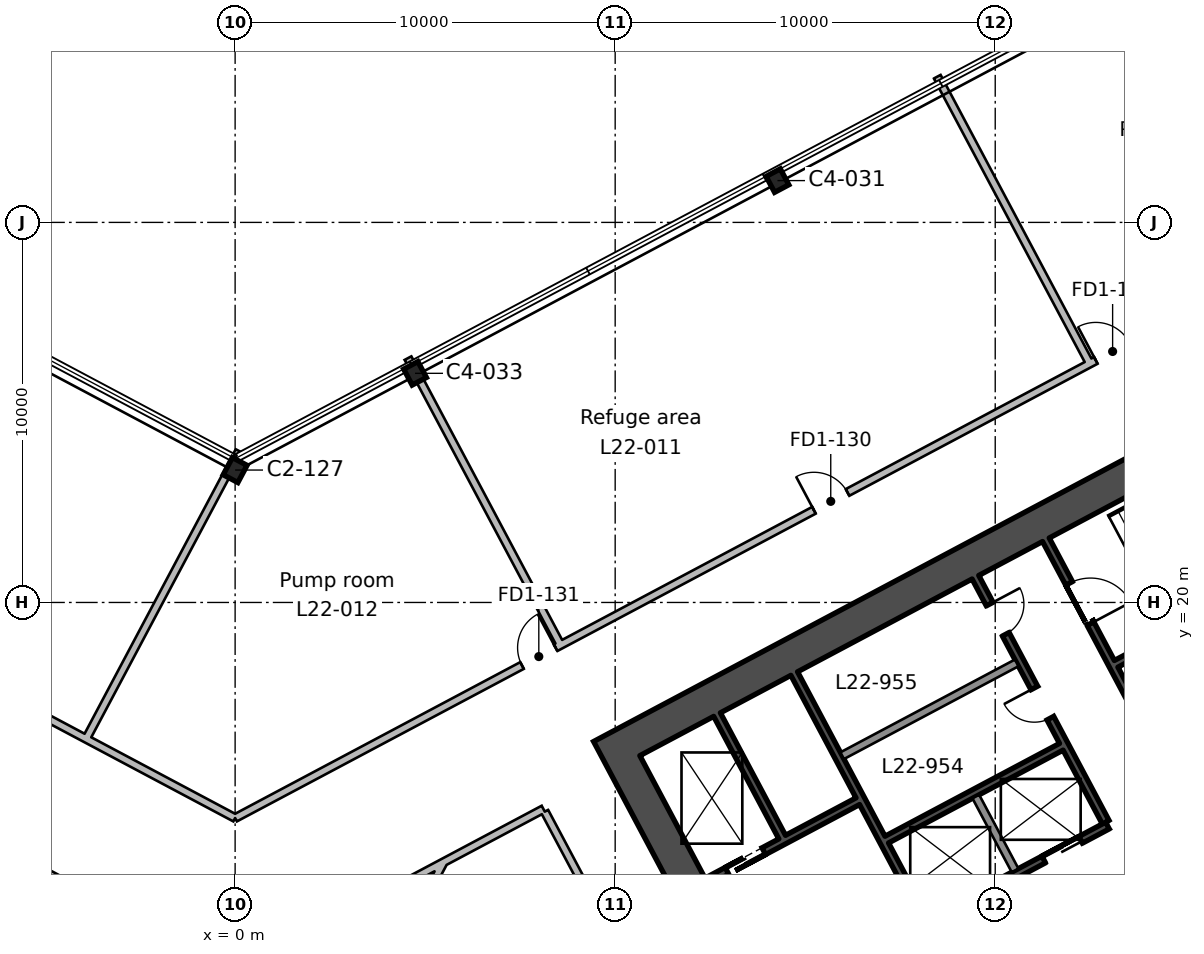
"""IFC4 building model, lengths in metres.
Left out: names, types, materials, properties, quantities, classifications, styles, units other than length and angle.
Written with IfcOpenShell. Run it as: python <this file> out.ifc"""

import sys

from ifc_helpers import new_model, si_unit, direction, frame, frame_2d, origin, origin_2d, place, context, subcontext, project, spatial, rectangle, i_section, extrude, element, fill, save


model = new_model("IFC4")
c1 = context("Model", 3, precision=1e-05, world=origin(), true_north=direction((0.0, 1.0)))
c2 = subcontext(c1, "Body", "Model", "MODEL_VIEW")
j1 = project(units=[si_unit("LENGTHUNIT", "METRE"), si_unit("PLANEANGLEUNIT", "RADIAN")], contexts=[c1])
p1 = place(None, origin())
s1 = spatial("IfcSite", under=j1, at=p1, CompositionType="ELEMENT")
p2 = place(p1, origin())
s2 = spatial("IfcBuilding", under=s1, at=p2, CompositionType="ELEMENT")
p3 = place(p2, frame((0.0, 0.0, 112.2)))
s3 = spatial("IfcBuildingStorey", under=s2, at=p3, CompositionType="ELEMENT", Elevation=112.2)
p4 = place(p3, frame((0.0, 23.484, 0.0), z_axis=(0.0, 0.0, 1.0), x_axis=(-0.882947592859, 0.469471562786, 0.0)))
e1 = element("IfcColumn", 1, at=p4, inside=s3, PredefinedType="COLUMN", context=c2, shape_type="SweptSolid", body=[
    extrude(i_section(OverallWidth=0.437, OverallDepth=0.513, WebThickness=0.061, FlangeThickness=0.097, FilletRadius=0.015, at=origin_2d()), origin(), (0.0, 0.0, 1.0), 6.0),
])
for number, where, z_axis, x_axis in (
    (2, (4.734, 26.029, 0.0), (0.0, 0.0, 1.0), (-0.883, -0.469, 0.0)),
    (3, (14.27, 31.1, 0.0), (0.0, 0.0, 1.0), (-0.883, -0.469, 0.0)),
):
    element("IfcColumn", number, at=place(p3, frame(where, z_axis=z_axis, x_axis=x_axis)), inside=s3, PredefinedType="COLUMN", context=c2, shape_type="SweptSolid", body=[
        extrude(i_section(OverallWidth=0.424, OverallDepth=0.475, WebThickness=0.048, FlangeThickness=0.077, FilletRadius=0.015, at=origin_2d()), origin(), (0.0, 0.0, 1.0), 6.0),
    ])
p5 = place(p3, frame((19.219, -1.107, 0.0), z_axis=(0.0, 0.0, 1.0), x_axis=(-0.46947084998, 0.882947971864, 0.0)))
e4 = element("IfcWall", 4, at=p5, inside=s3, PredefinedType="SHEAR", context=c2, shape_type="SweptSolid", body=[
    extrude(rectangle(XDim=20.0, YDim=0.9, at=frame_2d((10.0, 0.0))), origin(), (0.0, 0.0, 1.0), 6.0),
])
p6 = place(p5, frame((7.0, 0.0, 0.0)))
e5 = element("IfcOpeningElement", 5, at=p6, cuts=e4, PredefinedType="OPENING", context=c2, shape_type="SweptSolid", body=[
    extrude(rectangle(XDim=2.4, YDim=2.4, at=frame_2d((1.2, 1.2))), frame((0.0, 0.46, 0.0), z_axis=(0.0, -1.0, 0.0), x_axis=(1.0, 0.0, 0.0)), (0.0, 0.0, 1.0), 0.92),
])
p7 = place(p3, frame((10.438, 16.366, 0.0), z_axis=(0.0, 0.0, 1.0), x_axis=(0.88294509198, 0.469476266226, 0.0)))
e6 = element("IfcWall", 6, at=p7, inside=s3, PredefinedType="SHEAR", context=c2, shape_type="SweptSolid", body=[
    extrude(rectangle(XDim=20.2, YDim=0.9, at=frame_2d((10.1, 0.0))), origin(), (0.0, 0.0, 1.0), 6.0),
])
p8 = place(p3, frame((14.394, 13.826, 0.0), z_axis=(0.0, 0.0, 1.0), x_axis=(-0.469494272526, 0.882935517501, 0.0)))
e7 = element("IfcWall", 7, at=p8, inside=s3, PredefinedType="SHEAR", context=c2, shape_type="SweptSolid", body=[
    extrude(rectangle(XDim=3.65, YDim=0.2, at=frame_2d((1.825, 0.0))), origin(), (0.0, 0.0, 1.0), 6.0),
])
p9 = place(p3, frame((18.138, 11.683, 0.0), z_axis=(0.0, 0.0, 1.0), x_axis=(-0.469480409012, 0.88294288918, 0.0)))
e8 = element("IfcWall", 8, at=p9, inside=s3, PredefinedType="SHEAR", context=c2, shape_type="SweptSolid", body=[
    extrude(rectangle(XDim=7.3, YDim=0.2, at=frame_2d((3.65, 0.0))), origin(), (0.0, 0.0, 1.0), 6.0),
])
p10 = place(p3, frame((20.522, 12.95, 0.0), z_axis=(0.0, 0.0, 1.0), x_axis=(-0.469401318492, 0.882984938828, 0.0)))
e9 = element("IfcWall", 9, at=p10, inside=s3, PredefinedType="SOLIDWALL", context=c2, shape_type="SweptSolid", body=[
    extrude(rectangle(XDim=2.2, YDim=0.2, at=frame_2d((1.1, 0.0))), origin(), (0.0, 0.0, 1.0), 6.0),
])
p11 = place(p3, frame((22.906, 14.218, 0.0), z_axis=(0.0, 0.0, 1.0), x_axis=(-0.469480409012, 0.88294288918, 0.0)))
e10 = element("IfcWall", 10, at=p11, inside=s3, PredefinedType="SHEAR", context=c2, shape_type="SweptSolid", body=[
    extrude(rectangle(XDim=7.3, YDim=0.2, at=frame_2d((3.65, 0.0))), origin(), (0.0, 0.0, 1.0), 6.0),
])
p12 = place(p11, frame((3.1, 0.0, 0.0)))
e11 = element("IfcOpeningElement", 11, at=p12, cuts=e10, PredefinedType="OPENING", context=c2, shape_type="SweptSolid", body=[
    extrude(rectangle(XDim=0.9, YDim=2.1, at=frame_2d((0.45, 1.05))), frame((0.0, 0.11, 0.0), z_axis=(0.0, -1.0, 0.0), x_axis=(1.0, 0.0, 0.0)), (0.0, 0.0, 1.0), 0.22),
])
p13 = place(p11, frame((5.6, 0.0, 0.0)))
e12 = element("IfcOpeningElement", 12, at=p13, cuts=e10, PredefinedType="OPENING", context=c2, shape_type="SweptSolid", body=[
    extrude(rectangle(XDim=0.9, YDim=2.1, at=frame_2d((0.45, 1.05))), frame((0.0, 0.11, 0.0), z_axis=(0.0, -1.0, 0.0), x_axis=(1.0, 0.0, 0.0)), (0.0, 0.0, 1.0), 0.22),
])
p14 = place(p3, frame((24.76, 15.204, 0.0), z_axis=(0.0, 0.0, 1.0), x_axis=(-0.469494272526, 0.882935517501, 0.0)))
e13 = element("IfcWall", 13, at=p14, inside=s3, PredefinedType="SHEAR", context=c2, shape_type="SweptSolid", body=[
    extrude(rectangle(XDim=7.3, YDim=0.2, at=frame_2d((3.65, 0.0))), origin(), (0.0, 0.0, 1.0), 6.0),
])
p15 = place(p14, frame((4.8, 0.0, 0.0)))
e14 = element("IfcOpeningElement", 14, at=p15, cuts=e13, PredefinedType="OPENING", context=c2, shape_type="SweptSolid", body=[
    extrude(rectangle(XDim=1.2, YDim=2.1, at=frame_2d((0.6, 1.05))), frame((0.0, 0.11, 0.0), z_axis=(0.0, -1.0, 0.0), x_axis=(1.0, 0.0, 0.0)), (0.0, 0.0, 1.0), 0.22),
])
p16 = place(p3, frame((14.124, 9.435, 0.0), z_axis=(0.0, 0.0, 1.0), x_axis=(0.882940221191, 0.469485426614, 0.0)))
e15 = element("IfcWall", 15, at=p16, inside=s3, PredefinedType="SHEAR", context=c2, shape_type="SweptSolid", body=[
    extrude(rectangle(XDim=10.0, YDim=0.2, at=frame_2d((5.0, 0.0))), origin(), (0.0, 0.0, 1.0), 6.0),
])
p17 = place(p16, frame((2.1, 0.0, 0.0)))
e16 = element("IfcOpeningElement", 16, at=p17, cuts=e15, PredefinedType="OPENING", context=c2, shape_type="SweptSolid", body=[
    extrude(rectangle(XDim=1.2, YDim=2.1, at=frame_2d((0.6, 1.05))), frame((0.0, 0.11, 0.0), z_axis=(0.0, -1.0, 0.0), x_axis=(1.0, 0.0, 0.0)), (0.0, 0.0, 1.0), 0.22),
])
p18 = place(p16, frame((5.4, 0.0, 0.0)))
e17 = element("IfcOpeningElement", 17, at=p18, cuts=e15, PredefinedType="OPENING", context=c2, shape_type="SweptSolid", body=[
    extrude(rectangle(XDim=1.1, YDim=2.1, at=frame_2d((0.55, 1.05))), frame((0.0, 0.11, 0.0), z_axis=(0.0, -1.0, 0.0), x_axis=(1.0, 0.0, 0.0)), (0.0, 0.0, 1.0), 0.22),
])
p19 = place(p16, frame((8.1, 0.0, 0.0)))
e18 = element("IfcOpeningElement", 18, at=p19, cuts=e15, PredefinedType="OPENING", context=c2, shape_type="SweptSolid", body=[
    extrude(rectangle(XDim=1.1, YDim=2.1, at=frame_2d((0.55, 1.05))), frame((0.0, 0.11, 0.0), z_axis=(0.0, -1.0, 0.0), x_axis=(1.0, 0.0, 0.0)), (0.0, 0.0, 1.0), 0.22),
])
p20 = place(p3, frame((17.147, 13.761, 0.0), z_axis=(0.0, 0.0, 1.0), x_axis=(0.882964314875, 0.469440111896, 0.0)))
e19 = element("IfcWall", 19, at=p20, inside=s3, PredefinedType="SHEAR", context=c2, shape_type="SweptSolid", body=[
    extrude(rectangle(XDim=5.2, YDim=0.2, at=frame_2d((2.6, 0.0))), origin(), (0.0, 0.0, 1.0), 6.0),
])
p21 = place(p3, frame((12.41, 12.658, 0.0), z_axis=(0.0, 0.0, 1.0), x_axis=(0.8829484765, 0.469469900894, 0.0)))
e20 = element("IfcWall", 20, at=p21, inside=s3, PredefinedType="SHEAR", context=c2, shape_type="SweptSolid", body=[
    extrude(rectangle(XDim=4.5, YDim=0.2, at=frame_2d((2.25, 0.0))), origin(), (0.0, 0.0, 1.0), 6.0),
])
p22 = place(p21, frame((0.6, 0.0, 0.0)))
e21 = element("IfcOpeningElement", 21, at=p22, cuts=e20, PredefinedType="OPENING", context=c2, shape_type="SweptSolid", body=[
    extrude(rectangle(XDim=1.1, YDim=2.1, at=frame_2d((0.55, 1.05))), frame((0.0, 0.11, 0.0), z_axis=(0.0, -1.0, 0.0), x_axis=(1.0, 0.0, 0.0)), (0.0, 0.0, 1.0), 0.22),
])
p23 = place(p3, frame((23.182, 18.385, 0.0), z_axis=(0.0, 0.0, 1.0), x_axis=(0.88295287151, 0.469461634952, 0.0)))
e22 = element("IfcWall", 22, at=p23, inside=s3, PredefinedType="SHEAR", context=c2, shape_type="SweptSolid", body=[
    extrude(rectangle(XDim=8.0, YDim=0.2, at=frame_2d((4.0, 0.0))), origin(), (0.0, 0.0, 1.0), 6.0),
])
p24 = place(p3, frame((15.973, 15.968, 0.0), z_axis=(0.0, 0.0, 1.0), x_axis=(0.882953967957, 0.469459572775, 0.0)))
e23 = element("IfcWall", 23, at=p24, inside=s3, PredefinedType="SOLIDWALL", context=c2, shape_type="SweptSolid", body=[
    extrude(rectangle(XDim=5.2, YDim=0.2, at=frame_2d((2.6, 0.0))), origin(), (0.0, 0.0, 1.0), 6.0),
])
p25 = place(p3, frame((-32.823, 31.779, 0.0), z_axis=(0.0, 0.0, 1.0), x_axis=(0.88294925653, -0.469468433863, 0.0)))
e24 = element("IfcWall", 24, at=p25, inside=s3, PredefinedType="PARTITIONING", context=c2, shape_type="SweptSolid", body=[
    extrude(rectangle(XDim=37.174, YDim=0.2, at=frame_2d((18.587, 0.0))), origin(), (0.0, 0.0, 1.0), 5.55),
])
p26 = place(p25, frame((18.05, 0.0, 0.0)))
e25 = element("IfcOpeningElement", 25, at=p26, cuts=e24, PredefinedType="OPENING", context=c2, shape_type="SweptSolid", body=[
    extrude(rectangle(XDim=1.0, YDim=2.1, at=frame_2d((0.5, 1.05))), frame((0.0, 0.11, 0.0), z_axis=(0.0, -1.0, 0.0), x_axis=(1.0, 0.0, 0.0)), (0.0, 0.0, 1.0), 0.22),
])
p27 = place(p25, frame((9.05, 0.0, 0.0)))
e26 = element("IfcOpeningElement", 26, at=p27, cuts=e24, PredefinedType="OPENING", context=c2, shape_type="SweptSolid", body=[
    extrude(rectangle(XDim=1.0, YDim=2.1, at=frame_2d((0.5, 1.05))), frame((0.0, 0.11, 0.0), z_axis=(0.0, -1.0, 0.0), x_axis=(1.0, 0.0, 0.0)), (0.0, 0.0, 1.0), 0.22),
])
p28 = place(p3, frame((0.0, 14.327, 0.0), z_axis=(0.0, 0.0, 1.0), x_axis=(0.882944972043, 0.46947649179, 0.0)))
e27 = element("IfcWall", 27, at=p28, inside=s3, PredefinedType="PARTITIONING", context=c2, shape_type="SweptSolid", body=[
    extrude(rectangle(XDim=35.482, YDim=0.2, at=frame_2d((17.741, 0.0))), origin(), (0.0, 0.0, 1.0), 5.55),
])
p29 = place(p28, frame((25.65, 0.0, 0.0)))
e28 = element("IfcOpeningElement", 28, at=p29, cuts=e27, PredefinedType="OPENING", context=c2, shape_type="SweptSolid", body=[
    extrude(rectangle(XDim=1.0, YDim=2.1, at=frame_2d((0.5, 1.05))), frame((0.0, 0.11, 0.0), z_axis=(0.0, -1.0, 0.0), x_axis=(1.0, 0.0, 0.0)), (0.0, 0.0, 1.0), 0.22),
])
p30 = place(p28, frame((17.25, 0.0, 0.0)))
e29 = element("IfcOpeningElement", 29, at=p30, cuts=e27, PredefinedType="OPENING", context=c2, shape_type="SweptSolid", body=[
    extrude(rectangle(XDim=1.0, YDim=2.1, at=frame_2d((0.5, 1.05))), frame((0.0, 0.11, 0.0), z_axis=(0.0, -1.0, 0.0), x_axis=(1.0, 0.0, 0.0)), (0.0, 0.0, 1.0), 0.22),
])
p31 = place(p28, frame((8.55, 0.0, 0.0)))
e30 = element("IfcOpeningElement", 30, at=p31, cuts=e27, PredefinedType="OPENING", context=c2, shape_type="SweptSolid", body=[
    extrude(rectangle(XDim=1.0, YDim=2.1, at=frame_2d((0.5, 1.05))), frame((0.0, 0.11, 0.0), z_axis=(0.0, -1.0, 0.0), x_axis=(1.0, 0.0, 0.0)), (0.0, 0.0, 1.0), 0.22),
])
p32 = place(p3, frame((0.105, 23.984, 0.0), z_axis=(0.0, 0.0, 1.0), x_axis=(-0.469314098299, -0.883031300203, 0.0)))
e31 = element("IfcWall", 31, at=p32, inside=s3, PredefinedType="PARTITIONING", context=c2, shape_type="SweptSolid", body=[
    extrude(rectangle(XDim=8.576, YDim=0.2, at=frame_2d((4.288, 0.0))), origin(), (0.0, 0.0, 1.0), 5.55),
])
p33 = place(p3, frame((5.491, 13.169, 0.0), z_axis=(0.0, 0.0, 1.0), x_axis=(-0.882991151497, -0.469389631733, 0.0)))
e32 = element("IfcWall", 32, at=p33, inside=s3, PredefinedType="PARTITIONING", context=c2, shape_type="SweptSolid", body=[
    extrude(rectangle(XDim=6.219, YDim=0.2, at=frame_2d((3.109, 0.0))), origin(), (0.0, 0.0, 1.0), 5.55),
])
p34 = place(p3, frame((0.0, 10.25, 0.0), z_axis=(0.0, 0.0, 1.0), x_axis=(-0.882963933612, 0.469440829008, 0.0)))
e33 = element("IfcWall", 33, at=p34, inside=s3, PredefinedType="PARTITIONING", context=c2, shape_type="SweptSolid", body=[
    extrude(rectangle(XDim=7.833, YDim=0.2, at=frame_2d((3.917, 0.0))), origin(), (0.0, 0.0, 1.0), 5.55),
])
p35 = place(p3, frame((-5.427, -7.364, 0.0), z_axis=(0.0, 0.0, 1.0), x_axis=(0.469484998898, 0.88294044862, 0.0)))
e34 = element("IfcWall", 34, at=p35, inside=s3, PredefinedType="PARTITIONING", context=c2, shape_type="SweptSolid", body=[
    extrude(rectangle(XDim=23.255, YDim=0.2, at=frame_2d((11.627, 0.0))), origin(), (0.0, 0.0, 1.0), 5.55),
])
p36 = place(p3, frame((4.549, 26.429, 0.0), z_axis=(0.0, 0.0, 1.0), x_axis=(0.469471844694, -0.882947442965, 0.0)))
e35 = element("IfcWall", 35, at=p36, inside=s3, PredefinedType="PARTITIONING", context=c2, shape_type="SweptSolid", body=[
    extrude(rectangle(XDim=8.55, YDim=0.2, at=frame_2d((4.275, 0.0))), origin(), (0.0, 0.0, 1.0), 5.55),
])
p37 = place(p3, frame((57.135, 16.052, 0.0), z_axis=(0.0, 0.0, 1.0), x_axis=(-0.882947211229, -0.469472280528, 0.0)))
e36 = element("IfcWall", 36, at=p37, inside=s3, PredefinedType="PARTITIONING", context=c2, shape_type="SweptSolid", body=[
    extrude(rectangle(XDim=60.236, YDim=0.2, at=frame_2d((30.118, 0.0))), origin(), (0.0, 0.0, 1.0), 5.55),
])
p38 = place(p37, frame((38.75, 0.0, 0.0)))
e37 = element("IfcOpeningElement", 37, at=p38, cuts=e36, PredefinedType="OPENING", context=c2, shape_type="SweptSolid", body=[
    extrude(rectangle(XDim=1.0, YDim=2.1, at=frame_2d((0.5, 1.05))), frame((0.0, 0.11, 0.0), z_axis=(0.0, -1.0, 0.0), x_axis=(1.0, 0.0, 0.0)), (0.0, 0.0, 1.0), 0.22),
])
p39 = place(p37, frame((29.65, 0.0, 0.0)))
e38 = element("IfcOpeningElement", 38, at=p39, cuts=e36, PredefinedType="OPENING", context=c2, shape_type="SweptSolid", body=[
    extrude(rectangle(XDim=1.0, YDim=2.1, at=frame_2d((0.5, 1.05))), frame((0.0, 0.11, 0.0), z_axis=(0.0, -1.0, 0.0), x_axis=(1.0, 0.0, 0.0)), (0.0, 0.0, 1.0), 0.22),
])
p40 = place(p37, frame((20.85, 0.0, 0.0)))
e39 = element("IfcOpeningElement", 39, at=p40, cuts=e36, PredefinedType="OPENING", context=c2, shape_type="SweptSolid", body=[
    extrude(rectangle(XDim=1.0, YDim=2.1, at=frame_2d((0.5, 1.05))), frame((0.0, 0.11, 0.0), z_axis=(0.0, -1.0, 0.0), x_axis=(1.0, 0.0, 0.0)), (0.0, 0.0, 1.0), 0.22),
])
p41 = place(p3, frame((18.475, 33.834, 0.0), z_axis=(0.0, 0.0, 1.0), x_axis=(0.469471844694, -0.882947442965, 0.0)))
e40 = element("IfcWall", 40, at=p41, inside=s3, PredefinedType="PARTITIONING", context=c2, shape_type="SweptSolid", body=[
    extrude(rectangle(XDim=8.55, YDim=0.2, at=frame_2d((4.275, 0.0))), origin(), (0.0, 0.0, 1.0), 5.55),
])
p42 = place(p3, frame((8.113, 14.563, 0.0), z_axis=(0.0, 0.0, 1.0), x_axis=(-0.882966652267, -0.469435715498, 0.0)))
e41 = element("IfcWall", 41, at=p42, inside=s3, PredefinedType="PARTITIONING", context=c2, shape_type="SweptSolid", body=[
    extrude(rectangle(XDim=2.97, YDim=0.2, at=frame_2d((1.485, 0.0))), origin(), (0.0, 0.0, 1.0), 5.55),
])
p43 = place(p3, frame((8.148, 14.496, 0.0), z_axis=(0.0, 0.0, 1.0), x_axis=(0.469493235768, -0.882936068789, 0.0)))
e42 = element("IfcWall", 42, at=p43, inside=s3, PredefinedType="PARTITIONING", context=c2, shape_type="SweptSolid", body=[
    extrude(rectangle(XDim=18.024, YDim=0.2, at=frame_2d((9.012, 0.0))), origin(), (0.0, 0.0, 1.0), 5.55),
])
p44 = place(p43, frame((8.55, 0.0, 0.0)))
e43 = element("IfcOpeningElement", 43, at=p44, cuts=e42, PredefinedType="OPENING", context=c2, shape_type="SweptSolid", body=[
    extrude(rectangle(XDim=1.0, YDim=2.1, at=frame_2d((0.5, 1.05))), frame((0.0, 0.11, 0.0), z_axis=(0.0, -1.0, 0.0), x_axis=(1.0, 0.0, 0.0)), (0.0, 0.0, 1.0), 0.22),
])
p45 = place(p15, frame((1.2, 0.0, 0.0), z_axis=(0.0, 0.0, 1.0), x_axis=(-1.0, 0.0, 0.0)))
e44 = element("IfcDoor", 44, at=p45, inside=s3, OperationType="SINGLE_SWING_RIGHT", PredefinedType="DOOR", context=c2, shape_type="SweptSolid", body=[
    extrude(rectangle(XDim=1.2, YDim=2.1, at=frame_2d((0.6, 1.05))), frame((0.0, 0.025, 0.0), z_axis=(0.0, -1.0, 0.0), x_axis=(1.0, 0.0, 0.0)), (0.0, 0.0, 1.0), 0.05),
])
fill(e14, e44)
p46 = place(p19, origin())
e45 = element("IfcDoor", 45, at=p46, inside=s3, OperationType="DOUBLE_DOOR_SLIDING", PredefinedType="DOOR", context=c2, shape_type="SweptSolid", body=[
    extrude(rectangle(XDim=1.1, YDim=2.1, at=frame_2d((0.55, 1.05))), frame((0.0, 0.025, 0.0), z_axis=(0.0, -1.0, 0.0), x_axis=(1.0, 0.0, 0.0)), (0.0, 0.0, 1.0), 0.05),
])
fill(e18, e45)
p47 = place(p22, origin())
e46 = element("IfcDoor", 46, at=p47, inside=s3, OperationType="DOUBLE_DOOR_SLIDING", PredefinedType="DOOR", context=c2, shape_type="SweptSolid", body=[
    extrude(rectangle(XDim=1.1, YDim=2.1, at=frame_2d((0.55, 1.05))), frame((0.0, 0.025, 0.0), z_axis=(0.0, -1.0, 0.0), x_axis=(1.0, 0.0, 0.0)), (0.0, 0.0, 1.0), 0.05),
])
fill(e21, e46)
p48 = place(p12, origin())
e47 = element("IfcDoor", 47, at=p48, inside=s3, OperationType="SINGLE_SWING_RIGHT", PredefinedType="DOOR", context=c2, shape_type="SweptSolid", body=[
    extrude(rectangle(XDim=0.9, YDim=2.1, at=frame_2d((0.45, 1.05))), frame((0.0, 0.025, 0.0), z_axis=(0.0, -1.0, 0.0), x_axis=(1.0, 0.0, 0.0)), (0.0, 0.0, 1.0), 0.05),
])
fill(e11, e47)
p49 = place(p13, frame((0.9, 0.0, 0.0), z_axis=(0.0, 0.0, 1.0), x_axis=(-1.0, 0.0, 0.0)))
e48 = element("IfcDoor", 48, at=p49, inside=s3, OperationType="SINGLE_SWING_LEFT", PredefinedType="DOOR", context=c2, shape_type="SweptSolid", body=[
    extrude(rectangle(XDim=0.9, YDim=2.1, at=frame_2d((0.45, 1.05))), frame((0.0, 0.025, 0.0), z_axis=(0.0, -1.0, 0.0), x_axis=(1.0, 0.0, 0.0)), (0.0, 0.0, 1.0), 0.05),
])
fill(e12, e48)
p50 = place(p29, origin())
e49 = element("IfcDoor", 49, at=p50, inside=s3, OperationType="SINGLE_SWING_LEFT", PredefinedType="DOOR", context=c2, shape_type="SweptSolid", body=[
    extrude(rectangle(XDim=1.0, YDim=2.1, at=frame_2d((0.5, 1.05))), frame((0.0, 0.025, 0.0), z_axis=(0.0, -1.0, 0.0), x_axis=(1.0, 0.0, 0.0)), (0.0, 0.0, 1.0), 0.05),
])
fill(e28, e49)
p51 = place(p30, origin())
e50 = element("IfcDoor", 50, at=p51, inside=s3, OperationType="SINGLE_SWING_LEFT", PredefinedType="DOOR", context=c2, shape_type="SweptSolid", body=[
    extrude(rectangle(XDim=1.0, YDim=2.1, at=frame_2d((0.5, 1.05))), frame((0.0, 0.025, 0.0), z_axis=(0.0, -1.0, 0.0), x_axis=(1.0, 0.0, 0.0)), (0.0, 0.0, 1.0), 0.05),
])
fill(e29, e50)
p52 = place(p31, origin())
e51 = element("IfcDoor", 51, at=p52, inside=s3, OperationType="SINGLE_SWING_RIGHT", PredefinedType="DOOR", context=c2, shape_type="SweptSolid", body=[
    extrude(rectangle(XDim=1.0, YDim=2.1, at=frame_2d((0.5, 1.05))), frame((0.0, 0.025, 0.0), z_axis=(0.0, -1.0, 0.0), x_axis=(1.0, 0.0, 0.0)), (0.0, 0.0, 1.0), 0.05),
])
fill(e30, e51)
save(model, sys.argv[1])
